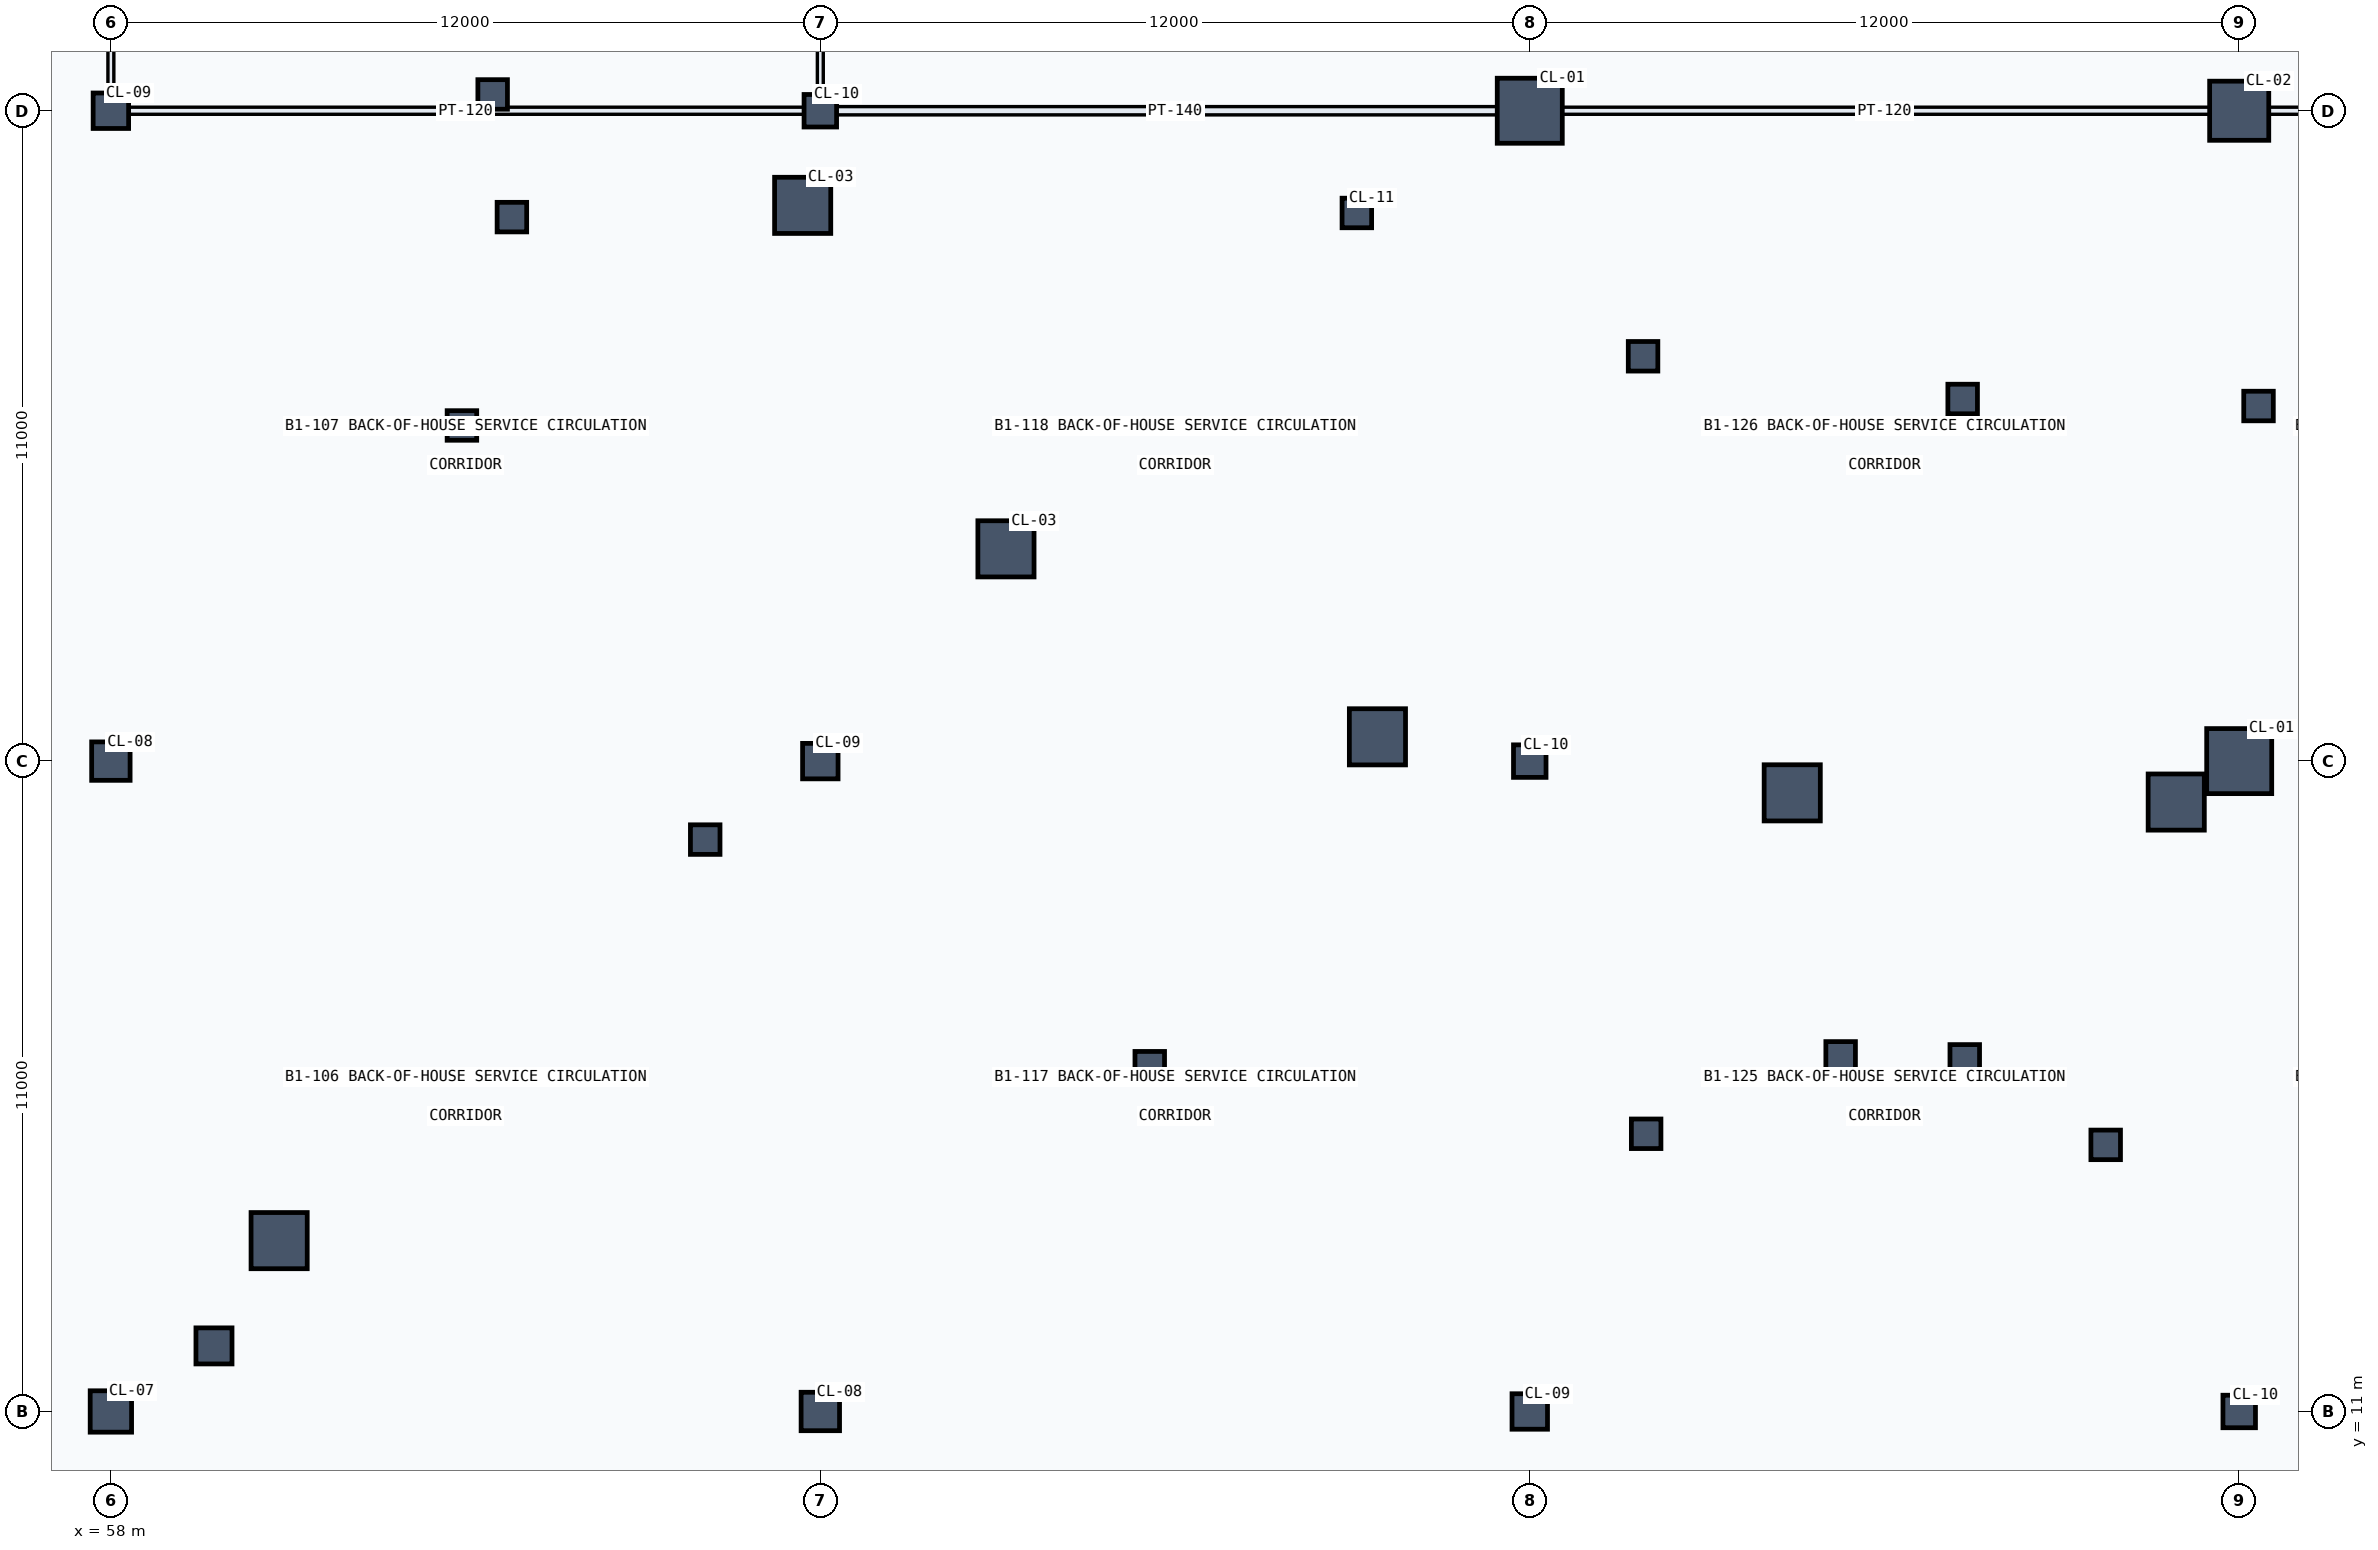
"""IFC4 building model, lengths in metres.
Left out: names, types, materials, properties, quantities, classifications, styles, units other than length and angle.
Written with IfcOpenShell. Run it as: python <this file> out.ifc"""

import sys

from ifc_helpers import new_model, si_unit, direction, frame, frame_2d, origin, origin_2d, place, context, subcontext, project, spatial, rectangle, hollow_circle, extrude, element, save


model = new_model("IFC4")
c1 = context("Model", 3, precision=1e-05, world=origin(), true_north=direction((0.0, 1.0)))
c2 = subcontext(c1, "Body", "Model", "MODEL_VIEW")
j1 = project(units=[si_unit("LENGTHUNIT", "METRE"), si_unit("PLANEANGLEUNIT", "RADIAN")], contexts=[c1])
p1 = place(None, origin())
s1 = spatial("IfcSite", under=j1, at=p1, CompositionType="ELEMENT")
p2 = place(p1, origin())
s2 = spatial("IfcBuilding", under=s1, at=p2, CompositionType="ELEMENT")
p3 = place(p2, frame((0.0, 0.0, -5.4)))
s3 = spatial("IfcBuildingStorey", under=s2, at=p3, CompositionType="ELEMENT", Elevation=-5.4)
p4 = place(p3, frame((58.0, 11.0, 0.0), z_axis=(0.0, 0.0, 1.0), x_axis=(1.0, 0.0, 0.0)))
e1 = element("IfcColumn", 1, at=p4, inside=s3, PredefinedType="COLUMN", context=c2, shape_type="SweptSolid", body=[
    extrude(rectangle(XDim=0.7, YDim=0.7, at=origin_2d()), origin(), (0.0, 0.0, 1.0), 5.4),
])
p5 = place(p3, frame((58.0, 22.0, 0.0), z_axis=(0.0, 0.0, 1.0), x_axis=(1.0, 0.0, 0.0)))
e2 = element("IfcColumn", 2, at=p5, inside=s3, PredefinedType="COLUMN", context=c2, shape_type="SweptSolid", body=[
    extrude(rectangle(XDim=0.65, YDim=0.65, at=origin_2d()), origin(), (0.0, 0.0, 1.0), 5.4),
])
p6 = place(p3, frame((58.0, 33.0, 0.0), z_axis=(0.0, 0.0, 1.0), x_axis=(1.0, 0.0, 0.0)))
e3 = element("IfcColumn", 3, at=p6, inside=s3, PredefinedType="COLUMN", context=c2, shape_type="SweptSolid", body=[
    extrude(rectangle(XDim=0.6, YDim=0.6, at=origin_2d()), origin(), (0.0, 0.0, 1.0), 5.4),
])
p7 = place(p3, frame((70.0, 11.0, 0.0), z_axis=(0.0, 0.0, 1.0), x_axis=(1.0, 0.0, 0.0)))
e4 = element("IfcColumn", 4, at=p7, inside=s3, PredefinedType="COLUMN", context=c2, shape_type="SweptSolid", body=[
    extrude(rectangle(XDim=0.65, YDim=0.65, at=origin_2d()), origin(), (0.0, 0.0, 1.0), 5.4),
])
p8 = place(p3, frame((70.0, 22.0, 0.0), z_axis=(0.0, 0.0, 1.0), x_axis=(1.0, 0.0, 0.0)))
e5 = element("IfcColumn", 5, at=p8, inside=s3, PredefinedType="COLUMN", context=c2, shape_type="SweptSolid", body=[
    extrude(rectangle(XDim=0.6, YDim=0.6, at=origin_2d()), origin(), (0.0, 0.0, 1.0), 5.4),
])
p9 = place(p3, frame((70.0, 33.0, 0.0), z_axis=(0.0, 0.0, 1.0), x_axis=(1.0, 0.0, 0.0)))
e6 = element("IfcColumn", 6, at=p9, inside=s3, PredefinedType="COLUMN", context=c2, shape_type="SweptSolid", body=[
    extrude(rectangle(XDim=0.55, YDim=0.55, at=origin_2d()), origin(), (0.0, 0.0, 1.0), 5.4),
])
p10 = place(p3, frame((82.0, 11.0, 0.0), z_axis=(0.0, 0.0, 1.0), x_axis=(1.0, 0.0, 0.0)))
e7 = element("IfcColumn", 7, at=p10, inside=s3, PredefinedType="COLUMN", context=c2, shape_type="SweptSolid", body=[
    extrude(rectangle(XDim=0.6, YDim=0.6, at=origin_2d()), origin(), (0.0, 0.0, 1.0), 5.4),
])
p11 = place(p3, frame((82.0, 22.0, 0.0), z_axis=(0.0, 0.0, 1.0), x_axis=(1.0, 0.0, 0.0)))
e8 = element("IfcColumn", 8, at=p11, inside=s3, PredefinedType="COLUMN", context=c2, shape_type="SweptSolid", body=[
    extrude(rectangle(XDim=0.55, YDim=0.55, at=origin_2d()), origin(), (0.0, 0.0, 1.0), 5.4),
])
p12 = place(p3, frame((82.0, 33.0, 0.0), z_axis=(0.0, 0.0, 1.0), x_axis=(1.0, 0.0, 0.0)))
e9 = element("IfcColumn", 9, at=p12, inside=s3, PredefinedType="COLUMN", context=c2, shape_type="SweptSolid", body=[
    extrude(rectangle(XDim=1.1, YDim=1.1, at=origin_2d()), origin(), (0.0, 0.0, 1.0), 5.4),
])
p13 = place(p3, frame((94.0, 11.0, 0.0), z_axis=(0.0, 0.0, 1.0), x_axis=(1.0, 0.0, 0.0)))
e10 = element("IfcColumn", 10, at=p13, inside=s3, PredefinedType="COLUMN", context=c2, shape_type="SweptSolid", body=[
    extrude(rectangle(XDim=0.55, YDim=0.55, at=origin_2d()), origin(), (0.0, 0.0, 1.0), 5.4),
])
p14 = place(p3, frame((94.0, 22.0, 0.0), z_axis=(0.0, 0.0, 1.0), x_axis=(1.0, 0.0, 0.0)))
e11 = element("IfcColumn", 11, at=p14, inside=s3, PredefinedType="COLUMN", context=c2, shape_type="SweptSolid", body=[
    extrude(rectangle(XDim=1.1, YDim=1.1, at=origin_2d()), origin(), (0.0, 0.0, 1.0), 5.4),
])
p15 = place(p3, frame((94.0, 33.0, 0.0), z_axis=(0.0, 0.0, 1.0), x_axis=(1.0, 0.0, 0.0)))
e12 = element("IfcColumn", 12, at=p15, inside=s3, PredefinedType="COLUMN", context=c2, shape_type="SweptSolid", body=[
    extrude(rectangle(XDim=1.0, YDim=1.0, at=origin_2d()), origin(), (0.0, 0.0, 1.0), 5.4),
])
p16 = place(p3, frame((59.744, 12.109, 0.0), z_axis=(0.0, 0.0, 1.0), x_axis=(1.0, 0.0, 0.0)))
e13 = element("IfcColumn", 13, at=p16, inside=s3, PredefinedType="COLUMN", context=c2, shape_type="SweptSolid", body=[
    extrude(hollow_circle(Radius=0.305, WallThickness=0.025, at=origin_2d()), origin(), (0.0, 0.0, 1.0), 5.4),
])
for number, where, z_axis, x_axis in (
    (14, (79.075, 31.271, 0.0), (0.0, 0.0, 1.0), (1.0, 0.0, 0.0)),
    (15, (83.917, 28.847, 0.0), (0.0, 0.0, 1.0), (1.0, 0.0, 0.0)),
    (16, (89.322, 28.125, 0.0), (0.0, 0.0, 1.0), (1.0, 0.0, 0.0)),
    (17, (94.327, 28.006, 0.0), (0.0, 0.0, 1.0), (1.0, 0.0, 0.0)),
    (18, (63.938, 27.677, 0.0), (0.0, 0.0, 1.0), (1.0, 0.0, 0.0)),
    (19, (68.053, 20.673, 0.0), (0.0, 0.0, 1.0), (1.0, 0.0, 0.0)),
    (20, (75.572, 16.839, 0.0), (0.0, 0.0, 1.0), (1.0, 0.0, 0.0)),
    (21, (83.969, 15.697, 0.0), (0.0, 0.0, 1.0), (1.0, 0.0, 0.0)),
    (22, (91.742, 15.509, 0.0), (0.0, 0.0, 1.0), (1.0, 0.0, 0.0)),
):
    element("IfcColumn", number, at=place(p3, frame(where, z_axis=z_axis, x_axis=x_axis)), inside=s3, PredefinedType="COLUMN", context=c2, shape_type="SweptSolid", body=[
        extrude(rectangle(XDim=0.5, YDim=0.5, at=origin_2d()), origin(), (0.0, 0.0, 1.0), 5.4),
    ])
for number, where, z_axis, x_axis in (
    (23, (69.701, 31.4, 0.0), (0.0, 0.0, 1.0), (1.0, 0.0, 0.0)),
    (24, (73.14, 25.59, 0.0), (0.0, 0.0, 1.0), (1.0, 0.0, 0.0)),
    (25, (79.423, 22.411, 0.0), (0.0, 0.0, 1.0), (1.0, 0.0, 0.0)),
    (26, (86.44, 21.463, 0.0), (0.0, 0.0, 1.0), (1.0, 0.0, 0.0)),
    (27, (92.935, 21.308, 0.0), (0.0, 0.0, 1.0), (1.0, 0.0, 0.0)),
    (28, (60.846, 13.89, 0.0), (0.0, 0.0, 1.0), (1.0, 0.0, 0.0)),
):
    element("IfcColumn", number, at=place(p3, frame(where, z_axis=z_axis, x_axis=x_axis)), inside=s3, PredefinedType="COLUMN", context=c2, shape_type="SweptSolid", body=[
        extrude(rectangle(XDim=0.95, YDim=0.95, at=origin_2d()), origin(), (0.0, 0.0, 1.0), 5.4),
    ])
for number, where, z_axis, x_axis in (
    (29, (64.458, 33.275, 0.0), (0.0, 0.0, 1.0), (1.0, 0.0, 0.0)),
    (30, (64.783, 31.201, 0.0), (0.0, 0.0, 1.0), (1.0, 0.0, 0.0)),
    (31, (87.258, 17.006, 0.0), (0.0, 0.0, 1.0), (1.0, 0.0, 0.0)),
    (32, (89.358, 16.955, 0.0), (0.0, 0.0, 1.0), (1.0, 0.0, 0.0)),
):
    element("IfcColumn", number, at=place(p3, frame(where, z_axis=z_axis, x_axis=x_axis)), inside=s3, PredefinedType="COLUMN", context=c2, shape_type="SweptSolid", body=[
        extrude(rectangle(XDim=0.5, YDim=0.5, at=origin_2d()), origin(), (0.0, 0.0, 1.0), 5.4),
    ])
p17 = place(p3, frame((70.22, 33.0, 0.0), z_axis=(0.0, 0.0, 1.0), x_axis=(1.0, 0.0, 0.0)))
e33 = element("IfcWall", 33, at=p17, inside=s3, PredefinedType="PARTITIONING", context=c2, shape_type="SweptSolid", body=[
    extrude(rectangle(XDim=11.56, YDim=0.14, at=frame_2d((5.78, 0.0))), origin(), (0.0, 0.0, 1.0), 4.418),
])
p18 = place(p3, frame((82.22, 33.0, 0.0), z_axis=(0.0, 0.0, 1.0), x_axis=(1.0, 0.0, 0.0)))
e34 = element("IfcWall", 34, at=p18, inside=s3, PredefinedType="PARTITIONING", context=c2, shape_type="SweptSolid", body=[
    extrude(rectangle(XDim=11.56, YDim=0.12, at=frame_2d((5.78, 0.0))), origin(), (0.0, 0.0, 1.0), 4.23),
])
p19 = place(p3, frame((94.22, 33.0, 0.0), z_axis=(0.0, 0.0, 1.0), x_axis=(1.0, 0.0, 0.0)))
e35 = element("IfcWall", 35, at=p19, inside=s3, PredefinedType="PARTITIONING", context=c2, shape_type="SweptSolid", body=[
    extrude(rectangle(XDim=9.56, YDim=0.12, at=frame_2d((4.78, 0.0))), origin(), (0.0, 0.0, 1.0), 4.23),
])
p20 = place(p3, frame((58.0, 33.22, 0.0), z_axis=(0.0, 0.0, 1.0), x_axis=(0.0, 1.0, 0.0)))
e36 = element("IfcWall", 36, at=p20, inside=s3, PredefinedType="PARTITIONING", context=c2, shape_type="SweptSolid", body=[
    extrude(rectangle(XDim=10.56, YDim=0.1, at=frame_2d((5.28, 0.0))), origin(), (0.0, 0.0, 1.0), 4.08),
])
p21 = place(p20, frame((4.53, 0.0, 0.0)))
e37 = element("IfcOpeningElement", 37, at=p21, cuts=e36, PredefinedType="OPENING", context=c2, shape_type="SweptSolid", body=[
    extrude(rectangle(XDim=1.5, YDim=2.3, at=frame_2d((0.75, 1.15))), frame((0.0, 0.06, 0.0), z_axis=(0.0, -1.0, 0.0), x_axis=(1.0, 0.0, 0.0)), (0.0, 0.0, 1.0), 0.12),
])
p22 = place(p3, frame((58.22, 33.0, 0.0), z_axis=(0.0, 0.0, 1.0), x_axis=(1.0, 0.0, 0.0)))
e38 = element("IfcWall", 38, at=p22, inside=s3, PredefinedType="PARTITIONING", context=c2, shape_type="SweptSolid", body=[
    extrude(rectangle(XDim=11.56, YDim=0.12, at=frame_2d((5.78, 0.0))), origin(), (0.0, 0.0, 1.0), 4.346),
])
p23 = place(p3, frame((70.0, 33.22, 0.0), z_axis=(0.0, 0.0, 1.0), x_axis=(0.0, 1.0, 0.0)))
e39 = element("IfcWall", 39, at=p23, inside=s3, PredefinedType="PARTITIONING", context=c2, shape_type="SweptSolid", body=[
    extrude(rectangle(XDim=10.56, YDim=0.1, at=frame_2d((5.28, 0.0))), origin(), (0.0, 0.0, 1.0), 4.08),
])
save(model, sys.argv[1])
